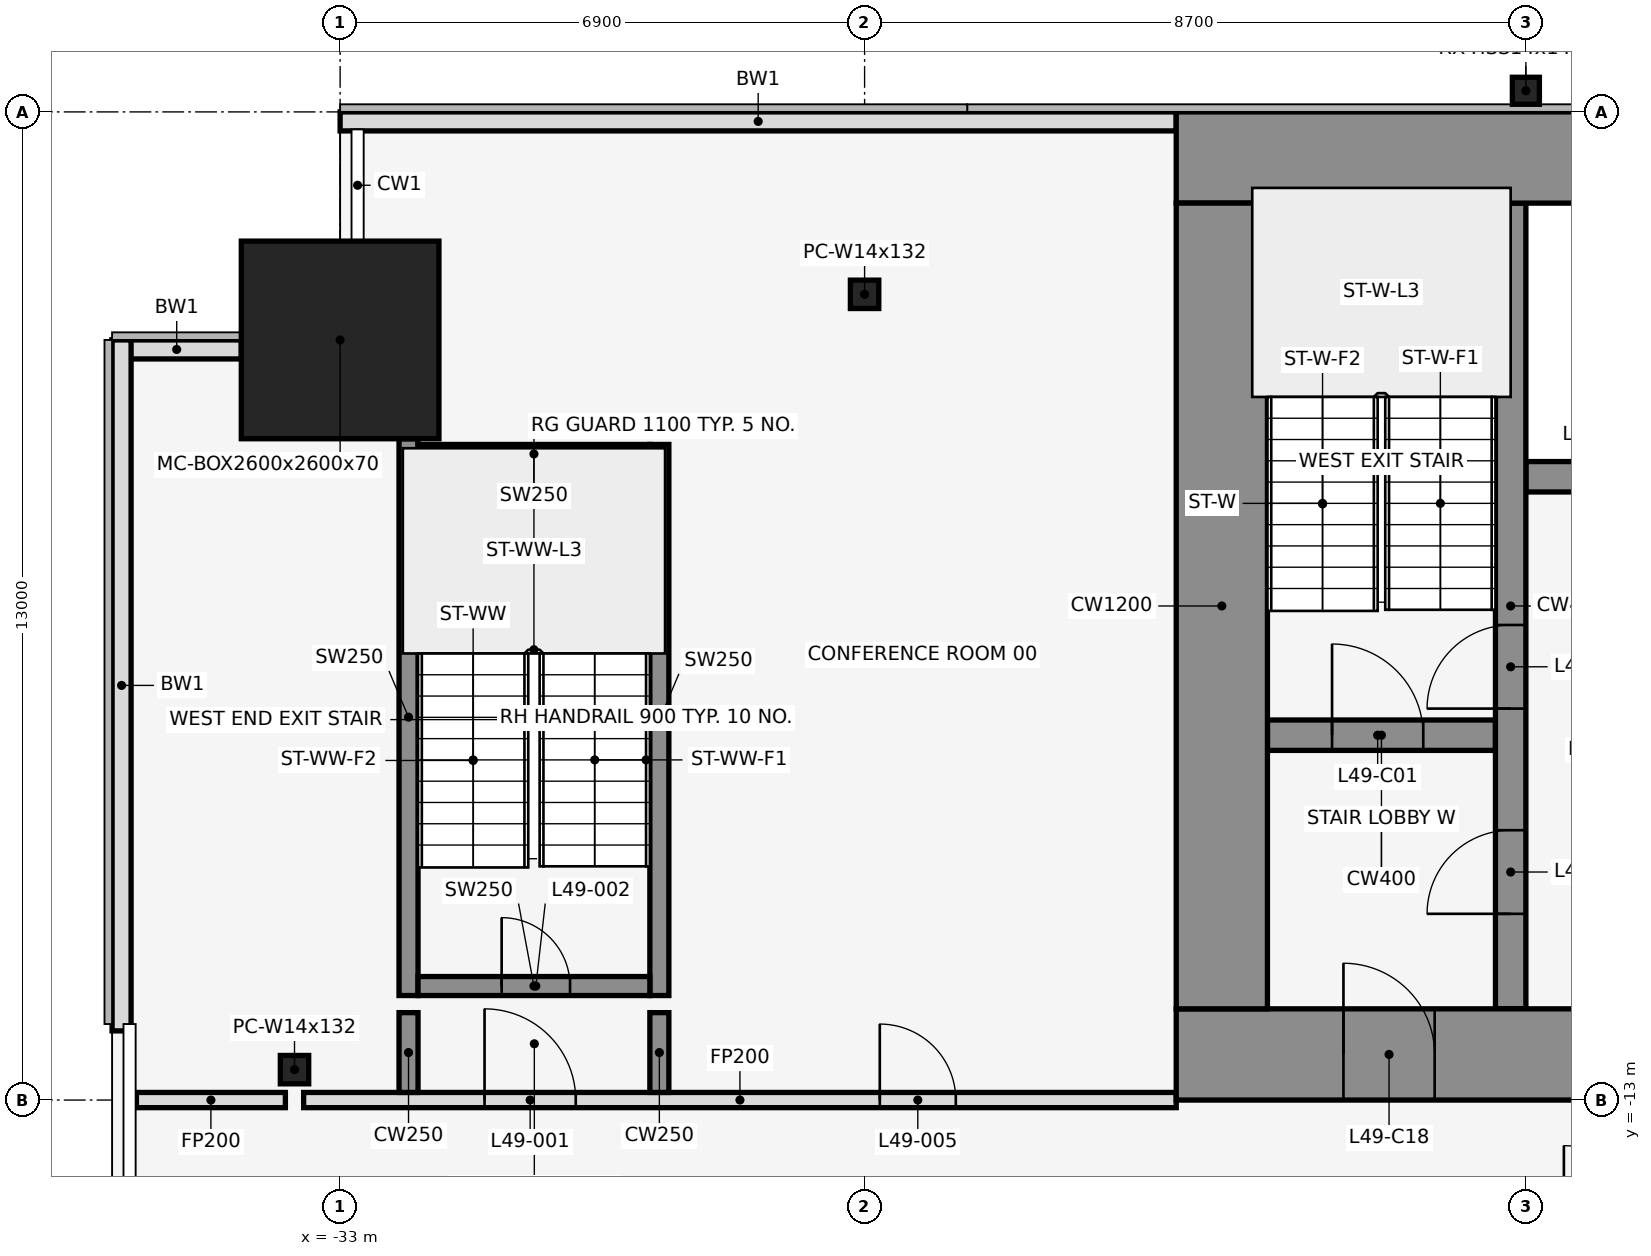
"""IFC4 building model, lengths in metres.
Left out: names, types, materials, properties, quantities, classifications, styles, units other than length and angle.
Written with IfcOpenShell. Run it as: python <this file> out.ifc"""

import sys

from ifc_helpers import new_model, si_unit, direction, frame, frame_2d, origin, origin_2d, place, context, subcontext, project, spatial, rectangle, hollow_rectangle, i_section, extrude, element, fill, save


model = new_model("IFC4")
c1 = context("Model", 3, precision=1e-05, world=origin(), true_north=direction((0.0, 1.0)))
c2 = subcontext(c1, "Body", "Model", "MODEL_VIEW")
j1 = project(units=[si_unit("LENGTHUNIT", "METRE"), si_unit("PLANEANGLEUNIT", "RADIAN")], contexts=[c1])
p1 = place(None, origin())
s1 = spatial("IfcSite", under=j1, at=p1, CompositionType="ELEMENT")
p2 = place(p1, origin())
s2 = spatial("IfcBuilding", under=s1, at=p2, CompositionType="ELEMENT")
p3 = place(p2, frame((0.0, 0.0, 219.6)))
s3 = spatial("IfcBuildingStorey", under=s2, at=p3, CompositionType="ELEMENT", Elevation=219.6)
p4 = place(p3, frame((-33.0, -3.0, 0.0), z_axis=(0.0, 0.0, 1.0), x_axis=(1.0, 0.0, 0.0)))
e1 = element("IfcColumn", 1, at=p4, inside=s3, PredefinedType="COLUMN", context=c2, shape_type="SweptSolid", body=[
    extrude(hollow_rectangle(XDim=2.6, YDim=2.6, WallThickness=0.07, at=origin_2d()), origin(), (0.0, 0.0, 1.0), 4.1),
])
p5 = place(p3, frame((-26.1, -2.4, 0.0), z_axis=(0.0, 0.0, 1.0), x_axis=(1.0, 0.0, 0.0)))
e2 = element("IfcColumn", 2, at=p5, inside=s3, PredefinedType="COLUMN", context=c2, shape_type="SweptSolid", body=[
    extrude(i_section(OverallWidth=0.373, OverallDepth=0.373, WebThickness=0.016, FlangeThickness=0.026, at=origin_2d()), origin(), (0.0, 0.0, 1.0), 4.1),
])
p6 = place(p3, frame((-17.4, 0.278, 0.0), z_axis=(0.0, 0.0, 1.0), x_axis=(1.0, 0.0, 0.0)))
e3 = element("IfcColumn", 3, at=p6, inside=s3, PredefinedType="COLUMN", context=c2, shape_type="SweptSolid", body=[
    extrude(hollow_rectangle(XDim=0.356, YDim=0.356, WallThickness=0.012, at=origin_2d()), origin(), (0.0, 0.0, 1.0), 4.1),
])
p7 = place(p3, frame((-33.6, -12.6, 0.0), z_axis=(0.0, 0.0, 1.0), x_axis=(1.0, 0.0, 0.0)))
e4 = element("IfcColumn", 4, at=p7, inside=s3, PredefinedType="COLUMN", context=c2, shape_type="SweptSolid", body=[
    extrude(i_section(OverallWidth=0.373, OverallDepth=0.373, WebThickness=0.016, FlangeThickness=0.026, at=origin_2d()), origin(), (0.0, 0.0, 1.0), 4.1),
])
p8 = place(p3, frame((-22.0, -0.125, 0.0), z_axis=(0.0, 0.0, 1.0), x_axis=(-1.0, 0.0, 0.0)))
e5 = element("IfcWall", 5, at=p8, inside=s3, PredefinedType="STANDARD", context=c2, shape_type="SweptSolid", body=[
    extrude(rectangle(XDim=11.0, YDim=0.25, at=frame_2d((5.5, 0.0))), origin(), (0.0, 0.0, 1.0), 3.95),
])
p9 = place(p3, frame((-34.3, -3.125, 0.0), z_axis=(0.0, 0.0, 1.0), x_axis=(-1.0, 0.0, 0.0)))
e6 = element("IfcWall", 6, at=p9, inside=s3, PredefinedType="STANDARD", context=c2, shape_type="SweptSolid", body=[
    extrude(rectangle(XDim=1.7, YDim=0.25, at=frame_2d((0.85, 0.0))), origin(), (0.0, 0.0, 1.0), 3.95),
])
p10 = place(p3, frame((-35.875, -3.0, 0.0), z_axis=(0.0, 0.0, 1.0), x_axis=(0.0, -1.0, 0.0)))
e7 = element("IfcWall", 7, at=p10, inside=s3, PredefinedType="STANDARD", context=c2, shape_type="SweptSolid", body=[
    extrude(rectangle(XDim=9.09, YDim=0.25, at=frame_2d((4.545, 0.0))), origin(), (0.0, 0.0, 1.0), 3.95),
])
p11 = place(p3, frame((-32.1, -11.625, 0.0), z_axis=(0.0, 0.0, 1.0), x_axis=(0.0, 1.0, 0.0)))
e8 = element("IfcWall", 8, at=p11, inside=s3, PredefinedType="SHEAR", context=c2, shape_type="SweptSolid", body=[
    extrude(rectangle(XDim=7.325, YDim=0.25, at=frame_2d((3.663, 0.0))), origin(), (0.0, 0.0, 1.0), 4.1),
])
p12 = place(p3, frame((-28.8, -11.625, 0.0), z_axis=(0.0, 0.0, 1.0), x_axis=(0.0, 1.0, 0.0)))
e9 = element("IfcWall", 9, at=p12, inside=s3, PredefinedType="SHEAR", context=c2, shape_type="SweptSolid", body=[
    extrude(rectangle(XDim=7.25, YDim=0.25, at=frame_2d((3.625, 0.0))), origin(), (0.0, 0.0, 1.0), 4.1),
])
p13 = place(p3, frame((-31.975, -11.5, 0.0), z_axis=(0.0, 0.0, 1.0), x_axis=(1.0, 0.0, 0.0)))
e10 = element("IfcWall", 10, at=p13, inside=s3, PredefinedType="SHEAR", context=c2, shape_type="SweptSolid", body=[
    extrude(rectangle(XDim=3.05, YDim=0.25, at=frame_2d((1.525, 0.0))), origin(), (0.0, 0.0, 1.0), 4.1),
])
p14 = place(p13, frame((1.1, 0.0, 0.0)))
e11 = element("IfcOpeningElement", 11, at=p14, cuts=e10, PredefinedType="OPENING", context=c2, shape_type="SweptSolid", body=[
    extrude(rectangle(XDim=0.9, YDim=2.1, at=frame_2d((0.45, 1.05))), frame((0.0, 0.137, 0.0), z_axis=(0.0, -1.0, 0.0), x_axis=(1.0, 0.0, 0.0)), (0.0, 0.0, 1.0), 0.274),
])
p15 = place(p3, frame((-31.975, -4.5, 0.0), z_axis=(0.0, 0.0, 1.0), x_axis=(1.0, 0.0, 0.0)))
e12 = element("IfcWall", 12, at=p15, inside=s3, PredefinedType="SHEAR", context=c2, shape_type="SweptSolid", body=[
    extrude(rectangle(XDim=3.05, YDim=0.25, at=frame_2d((1.525, 0.0))), origin(), (0.0, 0.0, 1.0), 4.1),
])
p16 = place(p3, frame((-35.68, -13.0, 0.0), z_axis=(0.0, 0.0, 1.0), x_axis=(1.0, 0.0, 0.0)))
e13 = element("IfcWall", 13, at=p16, inside=s3, PredefinedType="PARTITIONING", context=c2, shape_type="SweptSolid", body=[
    extrude(rectangle(XDim=1.96, YDim=0.2, at=frame_2d((0.98, 0.0))), origin(), (0.0, 0.0, 1.0), 2.84),
])
p17 = place(p3, frame((-33.48, -13.0, 0.0), z_axis=(0.0, 0.0, 1.0), x_axis=(1.0, 0.0, 0.0)))
e14 = element("IfcWall", 14, at=p17, inside=s3, PredefinedType="PARTITIONING", context=c2, shape_type="SweptSolid", body=[
    extrude(rectangle(XDim=11.48, YDim=0.2, at=frame_2d((5.74, 0.0))), origin(), (0.0, 0.0, 1.0), 2.84),
])
p18 = place(p17, frame((2.38, 0.0, 0.0)))
e15 = element("IfcOpeningElement", 15, at=p18, cuts=e14, PredefinedType="OPENING", context=c2, shape_type="SweptSolid", body=[
    extrude(rectangle(XDim=1.2, YDim=2.1, at=frame_2d((0.6, 1.05))), frame((0.0, 0.112, 0.0), z_axis=(0.0, -1.0, 0.0), x_axis=(1.0, 0.0, 0.0)), (0.0, 0.0, 1.0), 0.224),
])
p19 = place(p17, frame((7.58, 0.0, 0.0)))
e16 = element("IfcOpeningElement", 16, at=p19, cuts=e14, PredefinedType="OPENING", context=c2, shape_type="SweptSolid", body=[
    extrude(rectangle(XDim=1.0, YDim=2.1, at=frame_2d((0.5, 1.05))), frame((0.0, 0.112, 0.0), z_axis=(0.0, -1.0, 0.0), x_axis=(1.0, 0.0, 0.0)), (0.0, 0.0, 1.0), 0.224),
])
for number, where, z_axis, x_axis in (
    (17, (-32.1, -12.9, 0.0), (0.0, 0.0, 1.0), (0.0, 1.0, 0.0)),
    (18, (-28.8, -12.9, 0.0), (0.0, 0.0, 1.0), (0.0, 1.0, 0.0)),
):
    element("IfcWall", number, at=place(p3, frame(where, z_axis=z_axis, x_axis=x_axis)), inside=s3, PredefinedType="SHEAR", context=c2, shape_type="SweptSolid", body=[
        extrude(rectangle(XDim=1.05, YDim=0.25, at=frame_2d((0.525, 0.0))), origin(), (0.0, 0.0, 1.0), 4.1),
    ])
p20 = place(p3, frame((-20.8, -8.2, 0.0), z_axis=(0.0, 0.0, 1.0), x_axis=(1.0, 0.0, 0.0)))
e19 = element("IfcWall", 19, at=p20, inside=s3, PredefinedType="SHEAR", context=c2, shape_type="SweptSolid", body=[
    extrude(rectangle(XDim=3.0, YDim=0.4, at=frame_2d((1.5, 0.0))), origin(), (0.0, 0.0, 1.0), 4.1),
])
p21 = place(p20, frame((0.85, 0.0, 0.0)))
e20 = element("IfcOpeningElement", 20, at=p21, cuts=e19, PredefinedType="OPENING", context=c2, shape_type="SweptSolid", body=[
    extrude(rectangle(XDim=1.2, YDim=2.1, at=frame_2d((0.6, 1.05))), frame((0.0, 0.212, 0.0), z_axis=(0.0, -1.0, 0.0), x_axis=(1.0, 0.0, 0.0)), (0.0, 0.0, 1.0), 0.424),
])
p22 = place(p3, frame((-17.4, -4.8, 0.0), z_axis=(0.0, 0.0, 1.0), x_axis=(1.0, 0.0, 0.0)))
e21 = element("IfcWall", 21, at=p22, inside=s3, PredefinedType="SHEAR", context=c2, shape_type="SweptSolid", body=[
    extrude(rectangle(XDim=13.6, YDim=0.4, at=frame_2d((6.8, 0.0))), origin(), (0.0, 0.0, 1.0), 4.1),
])
p23 = place(p22, frame((0.65, 0.0, 0.0)))
e22 = element("IfcOpeningElement", 22, at=p23, cuts=e21, PredefinedType="OPENING", context=c2, shape_type="SweptSolid", body=[
    extrude(rectangle(XDim=1.1, YDim=2.1, at=frame_2d((0.55, 1.05))), frame((0.0, 0.212, 0.0), z_axis=(0.0, -1.0, 0.0), x_axis=(1.0, 0.0, 0.0)), (0.0, 0.0, 1.0), 0.424),
])
p24 = place(p22, frame((2.95, 0.0, 0.0)))
e23 = element("IfcOpeningElement", 23, at=p24, cuts=e21, PredefinedType="OPENING", context=c2, shape_type="SweptSolid", body=[
    extrude(rectangle(XDim=1.1, YDim=2.1, at=frame_2d((0.55, 1.05))), frame((0.0, 0.212, 0.0), z_axis=(0.0, -1.0, 0.0), x_axis=(1.0, 0.0, 0.0)), (0.0, 0.0, 1.0), 0.424),
])
p25 = place(p22, frame((8.75, 0.0, 0.0)))
e24 = element("IfcOpeningElement", 24, at=p25, cuts=e21, PredefinedType="OPENING", context=c2, shape_type="SweptSolid", body=[
    extrude(rectangle(XDim=0.9, YDim=2.1, at=frame_2d((0.45, 1.05))), frame((0.0, 0.212, 0.0), z_axis=(0.0, -1.0, 0.0), x_axis=(1.0, 0.0, 0.0)), (0.0, 0.0, 1.0), 0.424),
])
p26 = place(p3, frame((-17.6, -11.8, 0.0), z_axis=(0.0, 0.0, 1.0), x_axis=(0.0, 1.0, 0.0)))
e25 = element("IfcWall", 25, at=p26, inside=s3, PredefinedType="SHEAR", context=c2, shape_type="SweptSolid", body=[
    extrude(rectangle(XDim=10.6, YDim=0.4, at=frame_2d((5.3, 0.0))), origin(), (0.0, 0.0, 1.0), 4.1),
])
p27 = place(p26, frame((1.25, 0.0, 0.0)))
e26 = element("IfcOpeningElement", 26, at=p27, cuts=e25, PredefinedType="OPENING", context=c2, shape_type="SweptSolid", body=[
    extrude(rectangle(XDim=1.1, YDim=2.1, at=frame_2d((0.55, 1.05))), frame((0.0, 0.212, 0.0), z_axis=(0.0, -1.0, 0.0), x_axis=(1.0, 0.0, 0.0)), (0.0, 0.0, 1.0), 0.424),
])
p28 = place(p26, frame((3.95, 0.0, 0.0)))
e27 = element("IfcOpeningElement", 27, at=p28, cuts=e25, PredefinedType="OPENING", context=c2, shape_type="SweptSolid", body=[
    extrude(rectangle(XDim=1.1, YDim=2.1, at=frame_2d((0.55, 1.05))), frame((0.0, 0.212, 0.0), z_axis=(0.0, -1.0, 0.0), x_axis=(1.0, 0.0, 0.0)), (0.0, 0.0, 1.0), 0.424),
])
p29 = place(p3, frame((-22.0, -0.6, 0.0), z_axis=(0.0, 0.0, 1.0), x_axis=(1.0, 0.0, 0.0)))
e28 = element("IfcWall", 28, at=p29, inside=s3, PredefinedType="SHEAR", context=c2, shape_type="SweptSolid", body=[
    extrude(rectangle(XDim=44.0, YDim=1.2, at=frame_2d((22.0, 0.0))), origin(), (0.0, 0.0, 1.0), 4.1),
])
p30 = place(p29, frame((18.55, 0.0, 0.0)))
e29 = element("IfcOpeningElement", 29, at=p30, cuts=e28, PredefinedType="OPENING", context=c2, shape_type="SweptSolid", body=[
    extrude(rectangle(XDim=0.9, YDim=2.1, at=frame_2d((0.45, 1.05))), frame((0.0, 0.612, 0.0), z_axis=(0.0, -1.0, 0.0), x_axis=(1.0, 0.0, 0.0)), (0.0, 0.0, 1.0), 1.224),
])
p31 = place(p29, frame((24.55, 0.0, 0.0)))
e30 = element("IfcOpeningElement", 30, at=p31, cuts=e28, PredefinedType="OPENING", context=c2, shape_type="SweptSolid", body=[
    extrude(rectangle(XDim=0.9, YDim=2.1, at=frame_2d((0.45, 1.05))), frame((0.0, 0.612, 0.0), z_axis=(0.0, -1.0, 0.0), x_axis=(1.0, 0.0, 0.0)), (0.0, 0.0, 1.0), 1.224),
])
p32 = place(p3, frame((-22.0, -12.4, 0.0), z_axis=(0.0, 0.0, 1.0), x_axis=(1.0, 0.0, 0.0)))
e31 = element("IfcWall", 31, at=p32, inside=s3, PredefinedType="SHEAR", context=c2, shape_type="SweptSolid", body=[
    extrude(rectangle(XDim=44.0, YDim=1.2, at=frame_2d((22.0, 0.0))), origin(), (0.0, 0.0, 1.0), 4.1),
])
p33 = place(p32, frame((2.2, 0.0, 0.0)))
e32 = element("IfcOpeningElement", 32, at=p33, cuts=e31, PredefinedType="OPENING", context=c2, shape_type="SweptSolid", body=[
    extrude(rectangle(XDim=1.2, YDim=2.1, at=frame_2d((0.6, 1.05))), frame((0.0, 0.612, 0.0), z_axis=(0.0, -1.0, 0.0), x_axis=(1.0, 0.0, 0.0)), (0.0, 0.0, 1.0), 1.224),
])
p34 = place(p32, frame((21.4, 0.0, 0.0)))
e33 = element("IfcOpeningElement", 33, at=p34, cuts=e31, PredefinedType="OPENING", context=c2, shape_type="SweptSolid", body=[
    extrude(rectangle(XDim=1.2, YDim=2.1, at=frame_2d((0.6, 1.05))), frame((0.0, 0.612, 0.0), z_axis=(0.0, -1.0, 0.0), x_axis=(1.0, 0.0, 0.0)), (0.0, 0.0, 1.0), 1.224),
])
p35 = place(p32, frame((40.6, 0.0, 0.0)))
e34 = element("IfcOpeningElement", 34, at=p35, cuts=e31, PredefinedType="OPENING", context=c2, shape_type="SweptSolid", body=[
    extrude(rectangle(XDim=1.2, YDim=2.1, at=frame_2d((0.6, 1.05))), frame((0.0, 0.612, 0.0), z_axis=(0.0, -1.0, 0.0), x_axis=(1.0, 0.0, 0.0)), (0.0, 0.0, 1.0), 1.224),
])
p36 = place(p32, frame((16.0, 0.0, 0.0)))
e35 = element("IfcOpeningElement", 35, at=p36, cuts=e31, PredefinedType="OPENING", context=c2, shape_type="SweptSolid", body=[
    extrude(rectangle(XDim=1.8, YDim=2.1, at=frame_2d((0.9, 1.05))), frame((0.0, 0.612, 0.0), z_axis=(0.0, -1.0, 0.0), x_axis=(1.0, 0.0, 0.0)), (0.0, 0.0, 1.0), 1.224),
])
p37 = place(p32, frame((6.3, 0.0, 0.0)))
e36 = element("IfcOpeningElement", 36, at=p37, cuts=e31, PredefinedType="OPENING", context=c2, shape_type="SweptSolid", body=[
    extrude(rectangle(XDim=1.2, YDim=2.1, at=frame_2d((0.6, 1.05))), frame((0.0, 0.612, 0.0), z_axis=(0.0, -1.0, 0.0), x_axis=(1.0, 0.0, 0.0)), (0.0, 0.0, 1.0), 1.224),
])
p38 = place(p32, frame((26.2, 0.0, 0.0)))
e37 = element("IfcOpeningElement", 37, at=p38, cuts=e31, PredefinedType="OPENING", context=c2, shape_type="SweptSolid", body=[
    extrude(rectangle(XDim=1.8, YDim=2.1, at=frame_2d((0.9, 1.05))), frame((0.0, 0.612, 0.0), z_axis=(0.0, -1.0, 0.0), x_axis=(1.0, 0.0, 0.0)), (0.0, 0.0, 1.0), 1.224),
])
p39 = place(p32, frame((36.5, 0.0, 0.0)))
e38 = element("IfcOpeningElement", 38, at=p39, cuts=e31, PredefinedType="OPENING", context=c2, shape_type="SweptSolid", body=[
    extrude(rectangle(XDim=1.2, YDim=2.1, at=frame_2d((0.6, 1.05))), frame((0.0, 0.612, 0.0), z_axis=(0.0, -1.0, 0.0), x_axis=(1.0, 0.0, 0.0)), (0.0, 0.0, 1.0), 1.224),
])
p40 = place(p3, frame((-21.4, -11.8, 0.0), z_axis=(0.0, 0.0, 1.0), x_axis=(0.0, 1.0, 0.0)))
e39 = element("IfcWall", 39, at=p40, inside=s3, PredefinedType="SHEAR", context=c2, shape_type="SweptSolid", body=[
    extrude(rectangle(XDim=10.6, YDim=1.2, at=frame_2d((5.3, 0.0))), origin(), (0.0, 0.0, 1.0), 4.1),
])
p41 = place(p18, origin())
e40 = element("IfcDoor", 40, at=p41, inside=s3, OperationType="SINGLE_SWING_LEFT", PredefinedType="DOOR", context=c2, shape_type="SweptSolid", body=[
    extrude(rectangle(XDim=1.2, YDim=2.1, at=frame_2d((0.6, 1.05))), frame((0.0, 0.025, 0.0), z_axis=(0.0, -1.0, 0.0), x_axis=(1.0, 0.0, 0.0)), (0.0, 0.0, 1.0), 0.05),
])
fill(e15, e40)
p42 = place(p14, origin())
e41 = element("IfcDoor", 41, at=p42, inside=s3, OperationType="SINGLE_SWING_LEFT", PredefinedType="DOOR", context=c2, shape_type="SweptSolid", body=[
    extrude(rectangle(XDim=0.9, YDim=2.1, at=frame_2d((0.45, 1.05))), frame((0.0, 0.025, 0.0), z_axis=(0.0, -1.0, 0.0), x_axis=(1.0, 0.0, 0.0)), (0.0, 0.0, 1.0), 0.05),
])
fill(e11, e41)
p43 = place(p19, origin())
e42 = element("IfcDoor", 42, at=p43, inside=s3, OperationType="SINGLE_SWING_LEFT", PredefinedType="DOOR", context=c2, shape_type="SweptSolid", body=[
    extrude(rectangle(XDim=1.0, YDim=2.1, at=frame_2d((0.5, 1.05))), frame((0.0, 0.025, 0.0), z_axis=(0.0, -1.0, 0.0), x_axis=(1.0, 0.0, 0.0)), (0.0, 0.0, 1.0), 0.05),
])
fill(e16, e42)
p44 = place(p21, origin())
e43 = element("IfcDoor", 43, at=p44, inside=s3, OperationType="SINGLE_SWING_LEFT", PredefinedType="DOOR", context=c2, shape_type="SweptSolid", body=[
    extrude(rectangle(XDim=1.2, YDim=2.1, at=frame_2d((0.6, 1.05))), frame((0.0, 0.025, 0.0), z_axis=(0.0, -1.0, 0.0), x_axis=(1.0, 0.0, 0.0)), (0.0, 0.0, 1.0), 0.05),
])
fill(e20, e43)
p45 = place(p27, frame((1.1, 0.0, 0.0), z_axis=(0.0, 0.0, 1.0), x_axis=(-1.0, 0.0, 0.0)))
e44 = element("IfcDoor", 44, at=p45, inside=s3, OperationType="SINGLE_SWING_LEFT", PredefinedType="DOOR", context=c2, shape_type="SweptSolid", body=[
    extrude(rectangle(XDim=1.1, YDim=2.1, at=frame_2d((0.55, 1.05))), frame((0.0, 0.025, 0.0), z_axis=(0.0, -1.0, 0.0), x_axis=(1.0, 0.0, 0.0)), (0.0, 0.0, 1.0), 0.05),
])
fill(e26, e44)
p46 = place(p28, frame((1.1, 0.0, 0.0), z_axis=(0.0, 0.0, 1.0), x_axis=(-1.0, 0.0, 0.0)))
e45 = element("IfcDoor", 45, at=p46, inside=s3, OperationType="SINGLE_SWING_LEFT", PredefinedType="DOOR", context=c2, shape_type="SweptSolid", body=[
    extrude(rectangle(XDim=1.1, YDim=2.1, at=frame_2d((0.55, 1.05))), frame((0.0, 0.025, 0.0), z_axis=(0.0, -1.0, 0.0), x_axis=(1.0, 0.0, 0.0)), (0.0, 0.0, 1.0), 0.05),
])
fill(e27, e45)
p47 = place(p33, frame((1.2, 0.0, 0.0), z_axis=(0.0, 0.0, 1.0), x_axis=(-1.0, 0.0, 0.0)))
e46 = element("IfcDoor", 46, at=p47, inside=s3, OperationType="SINGLE_SWING_RIGHT", PredefinedType="DOOR", context=c2, shape_type="SweptSolid", body=[
    extrude(rectangle(XDim=1.2, YDim=2.1, at=frame_2d((0.6, 1.05))), frame((0.0, 0.025, 0.0), z_axis=(0.0, -1.0, 0.0), x_axis=(1.0, 0.0, 0.0)), (0.0, 0.0, 1.0), 0.05),
])
fill(e32, e46)
save(model, sys.argv[1])
